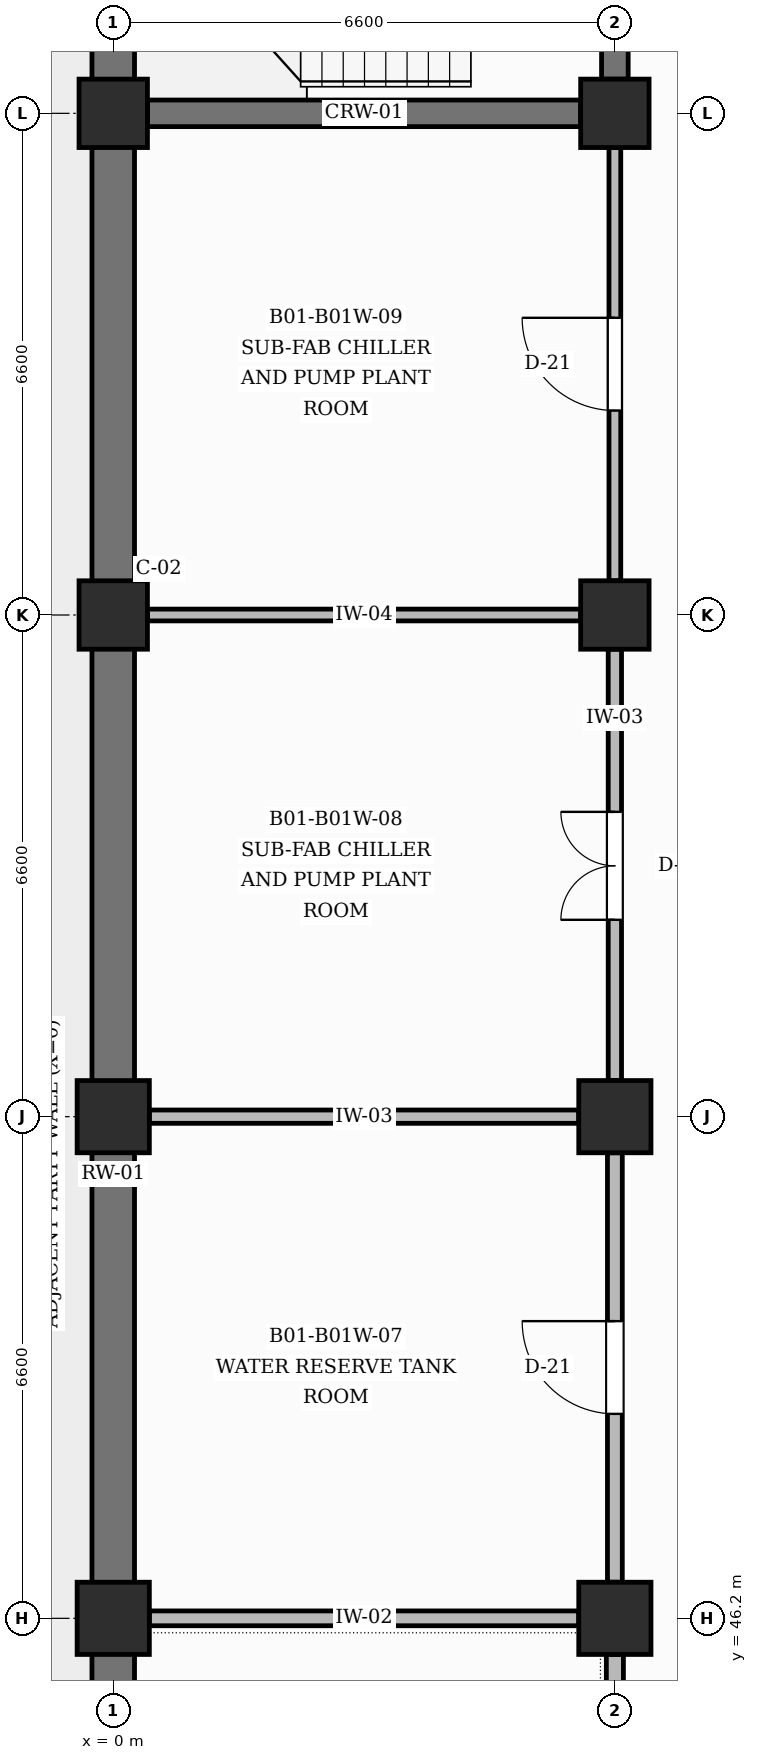
"""IFC4 building model, lengths in metres.
Left out: names, types, materials, properties, quantities, classifications, styles, units other than length and angle.
Written with IfcOpenShell. Run it as: python <this file> out.ifc"""

import sys

from ifc_helpers import new_model, si_unit, direction, frame, frame_2d, origin, origin_2d, place, context, subcontext, project, spatial, rectangle, extrude, element, fill, save


model = new_model("IFC4")
c1 = context("Model", 3, precision=1e-05, world=origin(), true_north=direction((0.0, 1.0)))
c2 = subcontext(c1, "Body", "Model", "MODEL_VIEW")
j1 = project(units=[si_unit("LENGTHUNIT", "METRE"), si_unit("PLANEANGLEUNIT", "RADIAN")], contexts=[c1])
p1 = place(None, origin())
s1 = spatial("IfcSite", under=j1, at=p1, CompositionType="ELEMENT")
p2 = place(p1, origin())
s2 = spatial("IfcBuilding", under=s1, at=p2, CompositionType="ELEMENT")
p3 = place(p2, frame((0.0, 0.0, -4.5)))
s3 = spatial("IfcBuildingStorey", under=s2, at=p3, CompositionType="ELEMENT", Elevation=-4.5)
for number, where, z_axis, x_axis in (
    (1, (0.0, 46.2, 0.0), (0.0, 0.0, 1.0), (1.0, 0.0, 0.0)),
    (2, (0.0, 52.8, 0.0), (0.0, 0.0, 1.0), (1.0, 0.0, 0.0)),
):
    element("IfcColumn", number, at=place(p3, frame(where, z_axis=z_axis, x_axis=x_axis)), inside=s3, PredefinedType="COLUMN", context=c2, shape_type="SweptSolid", body=[
        extrude(rectangle(XDim=0.95, YDim=0.95, at=origin_2d()), origin(), (0.0, 0.0, 1.0), 4.5),
    ])
for number, where, z_axis, x_axis in (
    (3, (0.0, 59.4, 0.0), (0.0, 0.0, 1.0), (1.0, 0.0, 0.0)),
    (4, (0.0, 66.0, 0.0), (0.0, 0.0, 1.0), (1.0, 0.0, 0.0)),
):
    element("IfcColumn", number, at=place(p3, frame(where, z_axis=z_axis, x_axis=x_axis)), inside=s3, PredefinedType="COLUMN", context=c2, shape_type="SweptSolid", body=[
        extrude(rectangle(XDim=0.9, YDim=0.9, at=origin_2d()), origin(), (0.0, 0.0, 1.0), 4.5),
    ])
for number, where, z_axis, x_axis in (
    (5, (6.6, 46.2, 0.0), (0.0, 0.0, 1.0), (1.0, 0.0, 0.0)),
    (6, (6.6, 52.8, 0.0), (0.0, 0.0, 1.0), (1.0, 0.0, 0.0)),
):
    element("IfcColumn", number, at=place(p3, frame(where, z_axis=z_axis, x_axis=x_axis)), inside=s3, PredefinedType="COLUMN", context=c2, shape_type="SweptSolid", body=[
        extrude(rectangle(XDim=0.95, YDim=0.95, at=origin_2d()), origin(), (0.0, 0.0, 1.0), 4.5),
    ])
for number, where, z_axis, x_axis in (
    (7, (6.6, 59.4, 0.0), (0.0, 0.0, 1.0), (1.0, 0.0, 0.0)),
    (8, (6.6, 66.0, 0.0), (0.0, 0.0, 1.0), (1.0, 0.0, 0.0)),
):
    element("IfcColumn", number, at=place(p3, frame(where, z_axis=z_axis, x_axis=x_axis)), inside=s3, PredefinedType="COLUMN", context=c2, shape_type="SweptSolid", body=[
        extrude(rectangle(XDim=0.9, YDim=0.9, at=origin_2d()), origin(), (0.0, 0.0, 1.0), 4.5),
    ])
p4 = place(p3, frame((0.0, 40.075, 0.0), z_axis=(0.0, 0.0, 1.0), x_axis=(0.0, 1.0, 0.0)))
e9 = element("IfcWall", 9, at=p4, inside=s3, PredefinedType="USERDEFINED", context=c2, shape_type="SweptSolid", body=[
    extrude(rectangle(XDim=5.65, YDim=0.56, at=frame_2d((2.825, 0.0))), origin(), (0.0, 0.0, 1.0), 3.49),
])
p5 = place(p3, frame((0.0, 46.675, 0.0), z_axis=(0.0, 0.0, 1.0), x_axis=(0.0, 1.0, 0.0)))
e10 = element("IfcWall", 10, at=p5, inside=s3, PredefinedType="USERDEFINED", context=c2, shape_type="SweptSolid", body=[
    extrude(rectangle(XDim=5.65, YDim=0.56, at=frame_2d((2.825, 0.0))), origin(), (0.0, 0.0, 1.0), 3.49),
])
p6 = place(p3, frame((0.0, 53.275, 0.0), z_axis=(0.0, 0.0, 1.0), x_axis=(0.0, 1.0, 0.0)))
e11 = element("IfcWall", 11, at=p6, inside=s3, PredefinedType="USERDEFINED", context=c2, shape_type="SweptSolid", body=[
    extrude(rectangle(XDim=5.675, YDim=0.56, at=frame_2d((2.837, 0.0))), origin(), (0.0, 0.0, 1.0), 3.49),
])
for number, where, z_axis, x_axis in (
    (12, (0.0, 59.85, 0.0), (0.0, 0.0, 1.0), (0.0, 1.0, 0.0)),
    (13, (0.0, 66.45, 0.0), (0.0, 0.0, 1.0), (0.0, 1.0, 0.0)),
):
    element("IfcWall", number, at=place(p3, frame(where, z_axis=z_axis, x_axis=x_axis)), inside=s3, PredefinedType="USERDEFINED", context=c2, shape_type="SweptSolid", body=[
        extrude(rectangle(XDim=5.7, YDim=0.56, at=frame_2d((2.85, 0.0))), origin(), (0.0, 0.0, 1.0), 3.49),
    ])
p7 = place(p3, frame((0.45, 66.0, 0.0), z_axis=(0.0, 0.0, 1.0), x_axis=(1.0, 0.0, 0.0)))
e14 = element("IfcWall", 14, at=p7, inside=s3, PredefinedType="SHEAR", context=c2, shape_type="SweptSolid", body=[
    extrude(rectangle(XDim=5.7, YDim=0.35, at=frame_2d((2.85, 0.0))), origin(), (0.0, 0.0, 1.0), 3.24),
])
p8 = place(p3, frame((6.6, 66.45, 0.0), z_axis=(0.0, 0.0, 1.0), x_axis=(0.0, 1.0, 0.0)))
e15 = element("IfcWall", 15, at=p8, inside=s3, PredefinedType="SHEAR", context=c2, shape_type="SweptSolid", body=[
    extrude(rectangle(XDim=5.7, YDim=0.35, at=frame_2d((2.85, 0.0))), origin(), (0.0, 0.0, 1.0), 3.34),
])
p9 = place(p8, frame((2.3, 0.0, 0.0)))
e16 = element("IfcOpeningElement", 16, at=p9, cuts=e15, PredefinedType="OPENING", context=c2, shape_type="SweptSolid", body=[
    extrude(rectangle(XDim=1.1, YDim=2.15, at=frame_2d((0.55, 1.075))), frame((0.0, 0.185, 0.0), z_axis=(0.0, -1.0, 0.0), x_axis=(1.0, 0.0, 0.0)), (0.0, 0.0, 1.0), 0.37),
])
p10 = place(p3, frame((6.6, 40.075, 0.0), z_axis=(0.0, 0.0, 1.0), x_axis=(0.0, 1.0, 0.0)))
e17 = element("IfcWall", 17, at=p10, inside=s3, PredefinedType="PARTITIONING", context=c2, shape_type="SweptSolid", body=[
    extrude(rectangle(XDim=5.65, YDim=0.225, at=frame_2d((2.825, 0.0))), origin(), (0.0, 0.0, 1.0), 3.34),
])
p11 = place(p3, frame((0.475, 46.2, 0.0), z_axis=(0.0, 0.0, 1.0), x_axis=(1.0, 0.0, 0.0)))
e18 = element("IfcWall", 18, at=p11, inside=s3, PredefinedType="PARTITIONING", context=c2, shape_type="SweptSolid", body=[
    extrude(rectangle(XDim=5.65, YDim=0.195, at=frame_2d((2.825, 0.0))), origin(), (0.0, 0.0, 1.0), 3.34),
])
p12 = place(p3, frame((6.6, 46.675, 0.0), z_axis=(0.0, 0.0, 1.0), x_axis=(0.0, 1.0, 0.0)))
e19 = element("IfcWall", 19, at=p12, inside=s3, PredefinedType="PARTITIONING", context=c2, shape_type="SweptSolid", body=[
    extrude(rectangle(XDim=5.65, YDim=0.195, at=frame_2d((2.825, 0.0))), origin(), (0.0, 0.0, 1.0), 3.34),
])
p13 = place(p12, frame((2.215, 0.0, 0.0)))
e20 = element("IfcOpeningElement", 20, at=p13, cuts=e19, PredefinedType="OPENING", context=c2, shape_type="SweptSolid", body=[
    extrude(rectangle(XDim=1.22, YDim=2.15, at=frame_2d((0.61, 1.075))), frame((0.0, 0.107, 0.0), z_axis=(0.0, -1.0, 0.0), x_axis=(1.0, 0.0, 0.0)), (0.0, 0.0, 1.0), 0.215),
])
p14 = place(p3, frame((0.475, 52.8, 0.0), z_axis=(0.0, 0.0, 1.0), x_axis=(1.0, 0.0, 0.0)))
e21 = element("IfcWall", 21, at=p14, inside=s3, PredefinedType="PARTITIONING", context=c2, shape_type="SweptSolid", body=[
    extrude(rectangle(XDim=5.65, YDim=0.175, at=frame_2d((2.825, 0.0))), origin(), (0.0, 0.0, 1.0), 3.24),
])
p15 = place(p3, frame((6.6, 53.275, 0.0), z_axis=(0.0, 0.0, 1.0), x_axis=(0.0, 1.0, 0.0)))
e22 = element("IfcWall", 22, at=p15, inside=s3, PredefinedType="PARTITIONING", context=c2, shape_type="SweptSolid", body=[
    extrude(rectangle(XDim=5.675, YDim=0.175, at=frame_2d((2.837, 0.0))), origin(), (0.0, 0.0, 1.0), 3.34),
])
p16 = place(p15, frame((2.115, 0.0, 0.0)))
e23 = element("IfcOpeningElement", 23, at=p16, cuts=e22, PredefinedType="OPENING", context=c2, shape_type="SweptSolid", body=[
    extrude(rectangle(XDim=1.42, YDim=2.2, at=frame_2d((0.71, 1.1))), frame((0.0, 0.097, 0.0), z_axis=(0.0, -1.0, 0.0), x_axis=(1.0, 0.0, 0.0)), (0.0, 0.0, 1.0), 0.195),
])
p17 = place(p3, frame((0.45, 59.4, 0.0), z_axis=(0.0, 0.0, 1.0), x_axis=(1.0, 0.0, 0.0)))
e24 = element("IfcWall", 24, at=p17, inside=s3, PredefinedType="PARTITIONING", context=c2, shape_type="SweptSolid", body=[
    extrude(rectangle(XDim=5.7, YDim=0.155, at=frame_2d((2.85, 0.0))), origin(), (0.0, 0.0, 1.0), 3.34),
])
p18 = place(p3, frame((6.6, 59.85, 0.0), z_axis=(0.0, 0.0, 1.0), x_axis=(0.0, 1.0, 0.0)))
e25 = element("IfcWall", 25, at=p18, inside=s3, PredefinedType="PARTITIONING", context=c2, shape_type="SweptSolid", body=[
    extrude(rectangle(XDim=5.7, YDim=0.155, at=frame_2d((2.85, 0.0))), origin(), (0.0, 0.0, 1.0), 3.34),
])
p19 = place(p18, frame((2.24, 0.0, 0.0)))
e26 = element("IfcOpeningElement", 26, at=p19, cuts=e25, PredefinedType="OPENING", context=c2, shape_type="SweptSolid", body=[
    extrude(rectangle(XDim=1.22, YDim=2.15, at=frame_2d((0.61, 1.075))), frame((0.0, 0.087, 0.0), z_axis=(0.0, -1.0, 0.0), x_axis=(1.0, 0.0, 0.0)), (0.0, 0.0, 1.0), 0.175),
])
p20 = place(p13, origin())
e27 = element("IfcDoor", 27, at=p20, inside=s3, OperationType="SINGLE_SWING_RIGHT", PredefinedType="DOOR", context=c2, shape_type="SweptSolid", body=[
    extrude(rectangle(XDim=1.22, YDim=2.15, at=frame_2d((0.61, 1.075))), frame((0.0, 0.025, 0.0), z_axis=(0.0, -1.0, 0.0), x_axis=(1.0, 0.0, 0.0)), (0.0, 0.0, 1.0), 0.05),
])
fill(e20, e27)
p21 = place(p16, origin())
e28 = element("IfcDoor", 28, at=p21, inside=s3, OperationType="DOUBLE_DOOR_SINGLE_SWING", PredefinedType="DOOR", context=c2, shape_type="SweptSolid", body=[
    extrude(rectangle(XDim=1.42, YDim=2.2, at=frame_2d((0.71, 1.1))), frame((0.0, 0.025, 0.0), z_axis=(0.0, -1.0, 0.0), x_axis=(1.0, 0.0, 0.0)), (0.0, 0.0, 1.0), 0.05),
])
fill(e23, e28)
p22 = place(p19, origin())
e29 = element("IfcDoor", 29, at=p22, inside=s3, OperationType="SINGLE_SWING_RIGHT", PredefinedType="DOOR", context=c2, shape_type="SweptSolid", body=[
    extrude(rectangle(XDim=1.22, YDim=2.15, at=frame_2d((0.61, 1.075))), frame((0.0, 0.025, 0.0), z_axis=(0.0, -1.0, 0.0), x_axis=(1.0, 0.0, 0.0)), (0.0, 0.0, 1.0), 0.05),
])
fill(e26, e29)
save(model, sys.argv[1])
